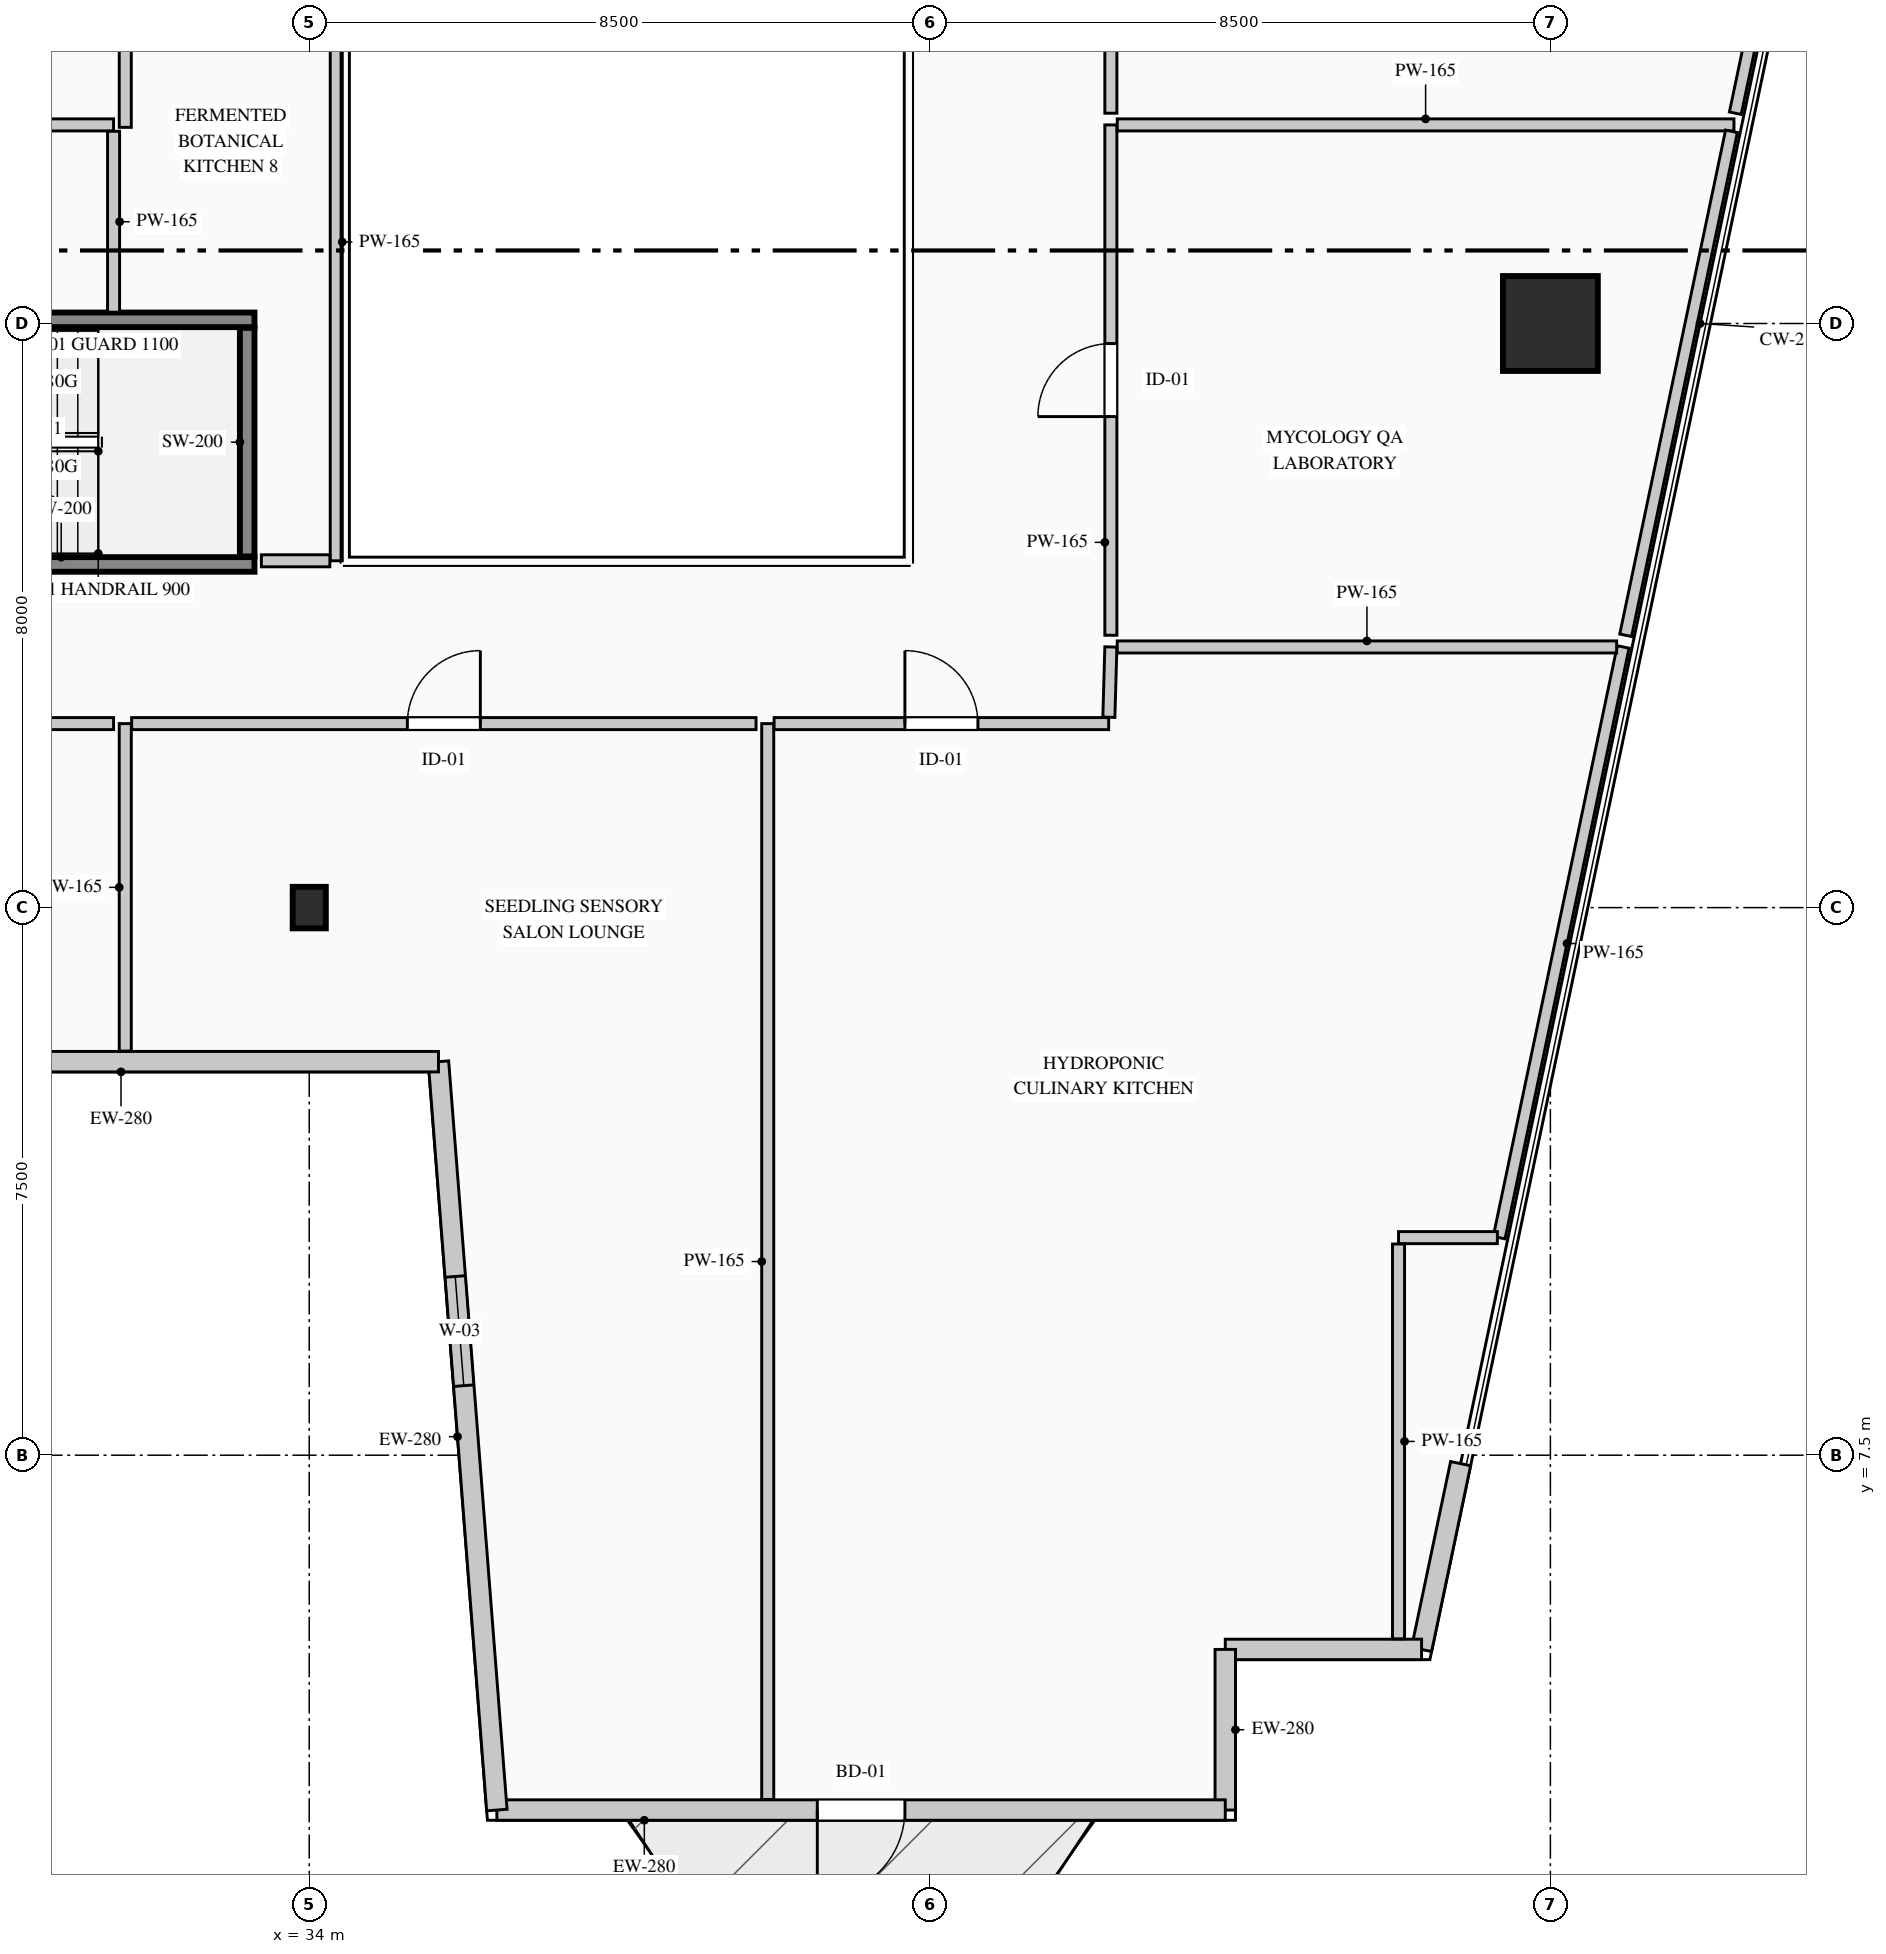
"""IFC4 building model, lengths in metres.
Left out: names, types, materials, properties, quantities, classifications, styles, units other than length and angle.
Written with IfcOpenShell. Run it as: python <this file> out.ifc"""

import sys

from ifc_helpers import new_model, si_unit, direction, frame, frame_2d, origin, origin_2d, place, context, subcontext, project, spatial, rectangle, i_section, extrude, element, fill, save


model = new_model("IFC4")
c1 = context("Model", 3, precision=1e-05, world=origin(), true_north=direction((0.0, 1.0)))
c2 = subcontext(c1, "Body", "Model", "MODEL_VIEW")
j1 = project(units=[si_unit("LENGTHUNIT", "METRE"), si_unit("PLANEANGLEUNIT", "RADIAN")], contexts=[c1])
p1 = place(None, origin())
s1 = spatial("IfcSite", under=j1, at=p1, CompositionType="ELEMENT")
p2 = place(p1, origin())
s2 = spatial("IfcBuilding", under=s1, at=p2, CompositionType="ELEMENT")
p3 = place(p2, frame((0.0, 0.0, 57.8)))
s3 = spatial("IfcBuildingStorey", under=s2, at=p3, CompositionType="ELEMENT", Elevation=57.8)
p4 = place(p3, frame((26.05, 19.7, 0.0), z_axis=(0.0, 0.0, 1.0), x_axis=(1.0, 0.0, 0.0)))
e1 = element("IfcWall", 1, at=p4, inside=s3, PredefinedType="SHEAR", context=c2, shape_type="SweptSolid", body=[
    extrude(rectangle(XDim=7.2, YDim=0.2, at=frame_2d((3.6, 0.0))), origin(), (0.0, 0.0, 1.0), 4.4),
])
p5 = place(p4, frame((0.38, 0.0, 0.0)))
e2 = element("IfcOpeningElement", 2, at=p5, cuts=e1, PredefinedType="OPENING", context=c2, shape_type="SweptSolid", body=[
    extrude(rectangle(XDim=1.15, YDim=2.2, at=frame_2d((0.575, 1.1))), frame((0.0, 0.11, 0.0), z_axis=(0.0, -1.0, 0.0), x_axis=(1.0, 0.0, 0.0)), (0.0, 0.0, 1.0), 0.22),
])
p6 = place(p3, frame((26.05, 23.05, 0.0), z_axis=(0.0, 0.0, 1.0), x_axis=(1.0, 0.0, 0.0)))
e3 = element("IfcWall", 3, at=p6, inside=s3, PredefinedType="SHEAR", context=c2, shape_type="SweptSolid", body=[
    extrude(rectangle(XDim=7.2, YDim=0.2, at=frame_2d((3.6, 0.0))), origin(), (0.0, 0.0, 1.0), 4.4),
])
p7 = place(p3, frame((33.15, 19.81, 0.0), z_axis=(0.0, 0.0, 1.0), x_axis=(0.0, 1.0, 0.0)))
e4 = element("IfcWall", 4, at=p7, inside=s3, PredefinedType="SHEAR", context=c2, shape_type="SweptSolid", body=[
    extrude(rectangle(XDim=3.13, YDim=0.2, at=frame_2d((1.565, 0.0))), origin(), (0.0, 0.0, 1.0), 4.4),
])
p8 = place(p3, frame((34.0, 15.0, 0.0), z_axis=(0.0, 0.0, 1.0), x_axis=(1.0, 0.0, 0.0)))
e5 = element("IfcColumn", 5, at=p8, inside=s3, PredefinedType="COLUMN", context=c2, shape_type="SweptSolid", body=[
    extrude(i_section(OverallWidth=0.454, OverallDepth=0.569, WebThickness=0.078, FlangeThickness=0.08, FilletRadius=0.015, at=origin_2d()), origin(), (0.0, 0.0, 1.0), 4.4),
])
p9 = place(p3, frame((51.0, 23.0, 0.0), z_axis=(0.0, 0.0, 1.0), x_axis=(1.0, 0.0, 0.0)))
e6 = element("IfcColumn", 6, at=p9, inside=s3, PredefinedType="COLUMN", context=c2, shape_type="SweptSolid", body=[
    extrude(rectangle(XDim=1.3, YDim=1.3, at=origin_2d()), origin(), (0.0, 0.0, 1.0), 4.4),
])
p10 = place(p3, frame((49.77, 7.385, 0.0), z_axis=(0.0, 0.0, 1.0), x_axis=(-0.205551409765, -0.978646319128, 0.0)))
e7 = element("IfcWall", 7, at=p10, inside=s3, PredefinedType="STANDARD", context=c2, shape_type="SweptSolid", body=[
    extrude(rectangle(XDim=2.6, YDim=0.28, at=frame_2d((1.3, 0.0))), origin(), (0.0, 0.0, 1.0), 4.1),
])
p11 = place(p3, frame((49.236, 4.84, 0.0), z_axis=(0.0, 0.0, 1.0), x_axis=(-1.0, 0.0, 0.0)))
e8 = element("IfcWall", 8, at=p11, inside=s3, PredefinedType="STANDARD", context=c2, shape_type="SweptSolid", body=[
    extrude(rectangle(XDim=2.688, YDim=0.28, at=frame_2d((1.344, 0.0))), origin(), (0.0, 0.0, 1.0), 4.1),
])
p12 = place(p3, frame((46.547, 4.84, 0.0), z_axis=(0.0, 0.0, 1.0), x_axis=(0.0, -1.0, 0.0)))
e9 = element("IfcWall", 9, at=p12, inside=s3, PredefinedType="STANDARD", context=c2, shape_type="SweptSolid", body=[
    extrude(rectangle(XDim=2.2, YDim=0.28, at=frame_2d((1.1, 0.0))), origin(), (0.0, 0.0, 1.0), 4.1),
])
p13 = place(p3, frame((46.547, 2.64, 0.0), z_axis=(0.0, 0.0, 1.0), x_axis=(-1.0, 0.0, 0.0)))
e10 = element("IfcWall", 10, at=p13, inside=s3, PredefinedType="STANDARD", context=c2, shape_type="SweptSolid", body=[
    extrude(rectangle(XDim=9.977, YDim=0.28, at=frame_2d((4.989, 0.0))), origin(), (0.0, 0.0, 1.0), 4.1),
])
p14 = place(p13, frame((4.388, 0.0, 0.0)))
e11 = element("IfcOpeningElement", 11, at=p14, cuts=e10, PredefinedType="OPENING", context=c2, shape_type="SweptSolid", body=[
    extrude(rectangle(XDim=1.2, YDim=2.2, at=frame_2d((0.6, 1.1))), frame((0.0, 0.15, 0.0), z_axis=(0.0, -1.0, 0.0), x_axis=(1.0, 0.0, 0.0)), (0.0, 0.0, 1.0), 0.3),
])
p15 = place(p3, frame((36.57, 2.64, 0.0), z_axis=(0.0, 0.0, 1.0), x_axis=(-0.077816860153, 0.996967670627, 0.0)))
e12 = element("IfcWall", 12, at=p15, inside=s3, PredefinedType="STANDARD", context=c2, shape_type="SweptSolid", body=[
    extrude(rectangle(XDim=10.281, YDim=0.28, at=frame_2d((5.141, 0.0))), origin(), (0.0, 0.0, 1.0), 4.1),
])
p16 = place(p15, frame((5.83, 0.0, 0.9)))
e13 = element("IfcOpeningElement", 13, at=p16, cuts=e12, PredefinedType="OPENING", context=c2, shape_type="SweptSolid", body=[
    extrude(rectangle(XDim=1.5, YDim=1.8, at=frame_2d((0.75, 0.9))), frame((0.0, 0.15, 0.0), z_axis=(0.0, -1.0, 0.0), x_axis=(1.0, 0.0, 0.0)), (0.0, 0.0, 1.0), 0.3),
])
p17 = place(p3, frame((35.77, 12.89, 0.0), z_axis=(0.0, 0.0, 1.0), x_axis=(-1.0, 0.0, 0.0)))
e14 = element("IfcWall", 14, at=p17, inside=s3, PredefinedType="STANDARD", context=c2, shape_type="SweptSolid", body=[
    extrude(rectangle(XDim=8.697, YDim=0.28, at=frame_2d((4.348, 0.0))), origin(), (0.0, 0.0, 1.0), 4.1),
])
p18 = place(p17, frame((5.511, 0.0, 0.9)))
e15 = element("IfcOpeningElement", 15, at=p18, cuts=e14, PredefinedType="OPENING", context=c2, shape_type="SweptSolid", body=[
    extrude(rectangle(XDim=1.5, YDim=1.8, at=frame_2d((0.75, 0.9))), frame((0.0, 0.15, 0.0), z_axis=(0.0, -1.0, 0.0), x_axis=(1.0, 0.0, 0.0)), (0.0, 0.0, 1.0), 0.3),
])
p19 = place(p3, frame((51.997, 18.57, 0.0), z_axis=(0.0, 0.0, 1.0), x_axis=(-0.205523740085, -0.978652130362, 0.0)))
e16 = element("IfcWall", 16, at=p19, inside=s3, PredefinedType="PARTITIONING", context=c2, shape_type="SweptSolid", body=[
    extrude(rectangle(XDim=8.267, YDim=0.165, at=frame_2d((4.133, 0.0))), origin(), (0.0, 0.0, 1.0), 4.1),
])
p20 = place(p3, frame((50.274, 10.48, 0.0), z_axis=(0.0, 0.0, 1.0), x_axis=(-1.0, 0.0, 0.0)))
e17 = element("IfcWall", 17, at=p20, inside=s3, PredefinedType="PARTITIONING", context=c2, shape_type="SweptSolid", body=[
    extrude(rectangle(XDim=1.354, YDim=0.165, at=frame_2d((0.677, 0.0))), origin(), (0.0, 0.0, 1.0), 4.1),
])
p21 = place(p3, frame((48.92, 10.393, 0.0), z_axis=(0.0, 0.0, 1.0), x_axis=(0.0, -1.0, 0.0)))
e18 = element("IfcWall", 18, at=p21, inside=s3, PredefinedType="PARTITIONING", context=c2, shape_type="SweptSolid", body=[
    extrude(rectangle(XDim=5.407, YDim=0.165, at=frame_2d((2.704, 0.0))), origin(), (0.0, 0.0, 1.0), 4.1),
])
p22 = place(p3, frame((40.28, 2.785, 0.0), z_axis=(0.0, 0.0, 1.0), x_axis=(0.0, 1.0, 0.0)))
e19 = element("IfcWall", 19, at=p22, inside=s3, PredefinedType="PARTITIONING", context=c2, shape_type="SweptSolid", body=[
    extrude(rectangle(XDim=14.735, YDim=0.165, at=frame_2d((7.368, 0.0))), origin(), (0.0, 0.0, 1.0), 4.1),
])
p23 = place(p3, frame((40.367, 17.52, 0.0), z_axis=(0.0, 0.0, 1.0), x_axis=(1.0, 0.0, 0.0)))
e20 = element("IfcWall", 20, at=p23, inside=s3, PredefinedType="PARTITIONING", context=c2, shape_type="SweptSolid", body=[
    extrude(rectangle(XDim=4.583, YDim=0.165, at=frame_2d((2.291, 0.0))), origin(), (0.0, 0.0, 1.0), 4.1),
])
p24 = place(p23, frame((1.791, 0.0, 0.0)))
e21 = element("IfcOpeningElement", 21, at=p24, cuts=e20, PredefinedType="OPENING", context=c2, shape_type="SweptSolid", body=[
    extrude(rectangle(XDim=1.0, YDim=2.15, at=frame_2d((0.5, 1.075))), frame((0.0, 0.093, 0.0), z_axis=(0.0, -1.0, 0.0), x_axis=(1.0, 0.0, 0.0)), (0.0, 0.0, 1.0), 0.185),
])
p25 = place(p3, frame((44.952, 17.607, 0.0), z_axis=(0.0, 0.0, 1.0), x_axis=(0.028624859452, 0.999590224753, 0.0)))
e22 = element("IfcWall", 22, at=p25, inside=s3, PredefinedType="PARTITIONING", context=c2, shape_type="SweptSolid", body=[
    extrude(rectangle(XDim=0.964, YDim=0.165, at=frame_2d((0.482, 0.0))), origin(), (0.0, 0.0, 1.0), 4.1),
])
p26 = place(p3, frame((45.067, 18.57, 0.0), z_axis=(0.0, 0.0, 1.0), x_axis=(1.0, 0.0, 0.0)))
e23 = element("IfcWall", 23, at=p26, inside=s3, PredefinedType="PARTITIONING", context=c2, shape_type="SweptSolid", body=[
    extrude(rectangle(XDim=6.841, YDim=0.165, at=frame_2d((3.42, 0.0))), origin(), (0.0, 0.0, 1.0), 4.1),
])
p27 = place(p3, frame((31.48, 13.035, 0.0), z_axis=(0.0, 0.0, 1.0), x_axis=(0.0, 1.0, 0.0)))
e24 = element("IfcWall", 24, at=p27, inside=s3, PredefinedType="PARTITIONING", context=c2, shape_type="SweptSolid", body=[
    extrude(rectangle(XDim=4.485, YDim=0.165, at=frame_2d((2.243, 0.0))), origin(), (0.0, 0.0, 1.0), 4.1),
])
p28 = place(p3, frame((31.567, 17.52, 0.0), z_axis=(0.0, 0.0, 1.0), x_axis=(1.0, 0.0, 0.0)))
e25 = element("IfcWall", 25, at=p28, inside=s3, PredefinedType="PARTITIONING", context=c2, shape_type="SweptSolid", body=[
    extrude(rectangle(XDim=8.553, YDim=0.165, at=frame_2d((4.276, 0.0))), origin(), (0.0, 0.0, 1.0), 3.685),
])
p29 = place(p28, frame((3.776, 0.0, 0.0)))
e26 = element("IfcOpeningElement", 26, at=p29, cuts=e25, PredefinedType="OPENING", context=c2, shape_type="SweptSolid", body=[
    extrude(rectangle(XDim=1.0, YDim=2.15, at=frame_2d((0.5, 1.075))), frame((0.0, 0.093, 0.0), z_axis=(0.0, -1.0, 0.0), x_axis=(1.0, 0.0, 0.0)), (0.0, 0.0, 1.0), 0.185),
])
p30 = place(p3, frame((22.68, 17.52, 0.0), z_axis=(0.0, 0.0, 1.0), x_axis=(1.0, 0.0, 0.0)))
e27 = element("IfcWall", 27, at=p30, inside=s3, PredefinedType="PARTITIONING", context=c2, shape_type="SweptSolid", body=[
    extrude(rectangle(XDim=8.64, YDim=0.165, at=frame_2d((4.32, 0.0))), origin(), (0.0, 0.0, 1.0), 3.685),
])
p31 = place(p30, frame((3.82, 0.0, 0.0)))
e28 = element("IfcOpeningElement", 28, at=p31, cuts=e27, PredefinedType="OPENING", context=c2, shape_type="SweptSolid", body=[
    extrude(rectangle(XDim=1.0, YDim=2.15, at=frame_2d((0.5, 1.075))), frame((0.0, 0.093, 0.0), z_axis=(0.0, -1.0, 0.0), x_axis=(1.0, 0.0, 0.0)), (0.0, 0.0, 1.0), 0.185),
])
p32 = place(p3, frame((44.98, 18.73, 0.0), z_axis=(0.0, 0.0, 1.0), x_axis=(0.0, 1.0, 0.0)))
e29 = element("IfcWall", 29, at=p32, inside=s3, PredefinedType="PARTITIONING", context=c2, shape_type="SweptSolid", body=[
    extrude(rectangle(XDim=6.99, YDim=0.165, at=frame_2d((3.495, 0.0))), origin(), (0.0, 0.0, 1.0), 4.1),
])
p33 = place(p32, frame((2.995, 0.0, 0.0)))
e30 = element("IfcOpeningElement", 30, at=p33, cuts=e29, PredefinedType="OPENING", context=c2, shape_type="SweptSolid", body=[
    extrude(rectangle(XDim=1.0, YDim=2.15, at=frame_2d((0.5, 1.075))), frame((0.0, 0.093, 0.0), z_axis=(0.0, -1.0, 0.0), x_axis=(1.0, 0.0, 0.0)), (0.0, 0.0, 1.0), 0.185),
])
p34 = place(p3, frame((45.067, 25.72, 0.0), z_axis=(0.0, 0.0, 1.0), x_axis=(1.0, 0.0, 0.0)))
e31 = element("IfcWall", 31, at=p34, inside=s3, PredefinedType="PARTITIONING", context=c2, shape_type="SweptSolid", body=[
    extrude(rectangle(XDim=8.447, YDim=0.165, at=frame_2d((4.224, 0.0))), origin(), (0.0, 0.0, 1.0), 4.1),
])
p35 = place(p3, frame((53.481, 25.633, 0.0), z_axis=(0.0, 0.0, 1.0), x_axis=(-0.205539446235, -0.97864883183, 0.0)))
e32 = element("IfcWall", 32, at=p35, inside=s3, PredefinedType="PARTITIONING", context=c2, shape_type="SweptSolid", body=[
    extrude(rectangle(XDim=7.053, YDim=0.165, at=frame_2d((3.527, 0.0))), origin(), (0.0, 0.0, 1.0), 4.1),
])
p36 = place(p3, frame((22.91, 25.72, 0.0), z_axis=(0.0, 0.0, 1.0), x_axis=(1.0, 0.0, 0.0)))
e33 = element("IfcWall", 33, at=p36, inside=s3, PredefinedType="PARTITIONING", context=c2, shape_type="SweptSolid", body=[
    extrude(rectangle(XDim=8.41, YDim=0.165, at=frame_2d((4.205, 0.0))), origin(), (0.0, 0.0, 1.0), 3.685),
])
p37 = place(p3, frame((31.32, 25.633, 0.0), z_axis=(0.0, 0.0, 1.0), x_axis=(0.0, -1.0, 0.0)))
e34 = element("IfcWall", 34, at=p37, inside=s3, PredefinedType="PARTITIONING", context=c2, shape_type="SweptSolid", body=[
    extrude(rectangle(XDim=2.478, YDim=0.165, at=frame_2d((1.239, 0.0))), origin(), (0.0, 0.0, 1.0), 4.1),
])
p38 = place(p3, frame((34.37, 28.482, 0.0), z_axis=(0.0, 0.0, 1.0), x_axis=(0.0, -1.0, 0.0)))
e35 = element("IfcWall", 35, at=p38, inside=s3, PredefinedType="PARTITIONING", context=c2, shape_type="SweptSolid", body=[
    extrude(rectangle(XDim=8.732, YDim=0.165, at=frame_2d((4.366, 0.0))), origin(), (0.0, 0.0, 1.0), 4.1),
])
p39 = place(p3, frame((34.282, 19.75, 0.0), z_axis=(0.0, 0.0, 1.0), x_axis=(-1.0, 0.0, 0.0)))
e36 = element("IfcWall", 36, at=p39, inside=s3, PredefinedType="PARTITIONING", context=c2, shape_type="SweptSolid", body=[
    extrude(rectangle(XDim=0.938, YDim=0.165, at=frame_2d((0.469, 0.0))), origin(), (0.0, 0.0, 1.0), 4.1),
])
p40 = place(p3, frame((31.48, 25.686, 0.0), z_axis=(0.0, 0.0, 1.0), x_axis=(0.0, 1.0, 0.0)))
e37 = element("IfcWall", 37, at=p40, inside=s3, PredefinedType="PARTITIONING", context=c2, shape_type="SweptSolid", body=[
    extrude(rectangle(XDim=2.796, YDim=0.165, at=frame_2d((1.398, 0.0))), origin(), (0.0, 0.0, 1.0), 4.1),
])
p41 = place(p3, frame((56.194, 38.548, 0.0), z_axis=(0.0, 0.0, 1.0), x_axis=(-0.205602677483, -0.978635549636, 0.0)))
e38 = element("IfcWall", 38, at=p41, inside=s3, PredefinedType="PARTITIONING", context=c2, shape_type="SweptSolid", body=[
    extrude(rectangle(XDim=12.944, YDim=0.165, at=frame_2d((6.472, 0.0))), origin(), (0.0, 0.0, 1.0), 4.1),
])
p42 = place(p3, frame((44.98, 25.88, 0.0), z_axis=(0.0, 0.0, 1.0), x_axis=(0.0, 1.0, 0.0)))
e39 = element("IfcWall", 39, at=p42, inside=s3, PredefinedType="PARTITIONING", context=c2, shape_type="SweptSolid", body=[
    extrude(rectangle(XDim=8.15, YDim=0.165, at=frame_2d((4.075, 0.0))), origin(), (0.0, 0.0, 1.0), 3.685),
])
p43 = place(p42, frame((3.575, 0.0, 0.0)))
e40 = element("IfcOpeningElement", 40, at=p43, cuts=e39, PredefinedType="OPENING", context=c2, shape_type="SweptSolid", body=[
    extrude(rectangle(XDim=1.0, YDim=2.15, at=frame_2d((0.5, 1.075))), frame((0.0, 0.093, 0.0), z_axis=(0.0, -1.0, 0.0), x_axis=(1.0, 0.0, 0.0)), (0.0, 0.0, 1.0), 0.185),
])
p44 = place(p14, origin())
e41 = element("IfcDoor", 41, at=p44, inside=s3, OperationType="SINGLE_SWING_RIGHT", PredefinedType="DOOR", context=c2, shape_type="SweptSolid", body=[
    extrude(rectangle(XDim=1.2, YDim=2.2, at=frame_2d((0.6, 1.1))), frame((0.0, 0.025, 0.0), z_axis=(0.0, -1.0, 0.0), x_axis=(1.0, 0.0, 0.0)), (0.0, 0.0, 1.0), 0.05),
])
fill(e11, e41)
p45 = place(p16, origin())
e42 = element("IfcWindow", 42, at=p45, inside=s3, PartitioningType="SINGLE_PANEL", PredefinedType="WINDOW", context=c2, shape_type="SweptSolid", body=[
    extrude(rectangle(XDim=1.5, YDim=1.8, at=frame_2d((0.75, 0.9))), frame((0.0, 0.03, 0.0), z_axis=(0.0, -1.0, 0.0), x_axis=(1.0, 0.0, 0.0)), (0.0, 0.0, 1.0), 0.06),
])
fill(e13, e42)
p46 = place(p24, origin())
e43 = element("IfcDoor", 43, at=p46, inside=s3, OperationType="SINGLE_SWING_LEFT", PredefinedType="DOOR", context=c2, shape_type="SweptSolid", body=[
    extrude(rectangle(XDim=1.0, YDim=2.15, at=frame_2d((0.5, 1.075))), frame((0.0, 0.025, 0.0), z_axis=(0.0, -1.0, 0.0), x_axis=(1.0, 0.0, 0.0)), (0.0, 0.0, 1.0), 0.05),
])
fill(e21, e43)
p47 = place(p29, origin())
e44 = element("IfcDoor", 44, at=p47, inside=s3, OperationType="SINGLE_SWING_RIGHT", PredefinedType="DOOR", context=c2, shape_type="SweptSolid", body=[
    extrude(rectangle(XDim=1.0, YDim=2.15, at=frame_2d((0.5, 1.075))), frame((0.0, 0.025, 0.0), z_axis=(0.0, -1.0, 0.0), x_axis=(1.0, 0.0, 0.0)), (0.0, 0.0, 1.0), 0.05),
])
fill(e26, e44)
p48 = place(p33, origin())
e45 = element("IfcDoor", 45, at=p48, inside=s3, OperationType="SINGLE_SWING_LEFT", PredefinedType="DOOR", context=c2, shape_type="SweptSolid", body=[
    extrude(rectangle(XDim=1.0, YDim=2.15, at=frame_2d((0.5, 1.075))), frame((0.0, 0.025, 0.0), z_axis=(0.0, -1.0, 0.0), x_axis=(1.0, 0.0, 0.0)), (0.0, 0.0, 1.0), 0.05),
])
fill(e30, e45)
save(model, sys.argv[1])
